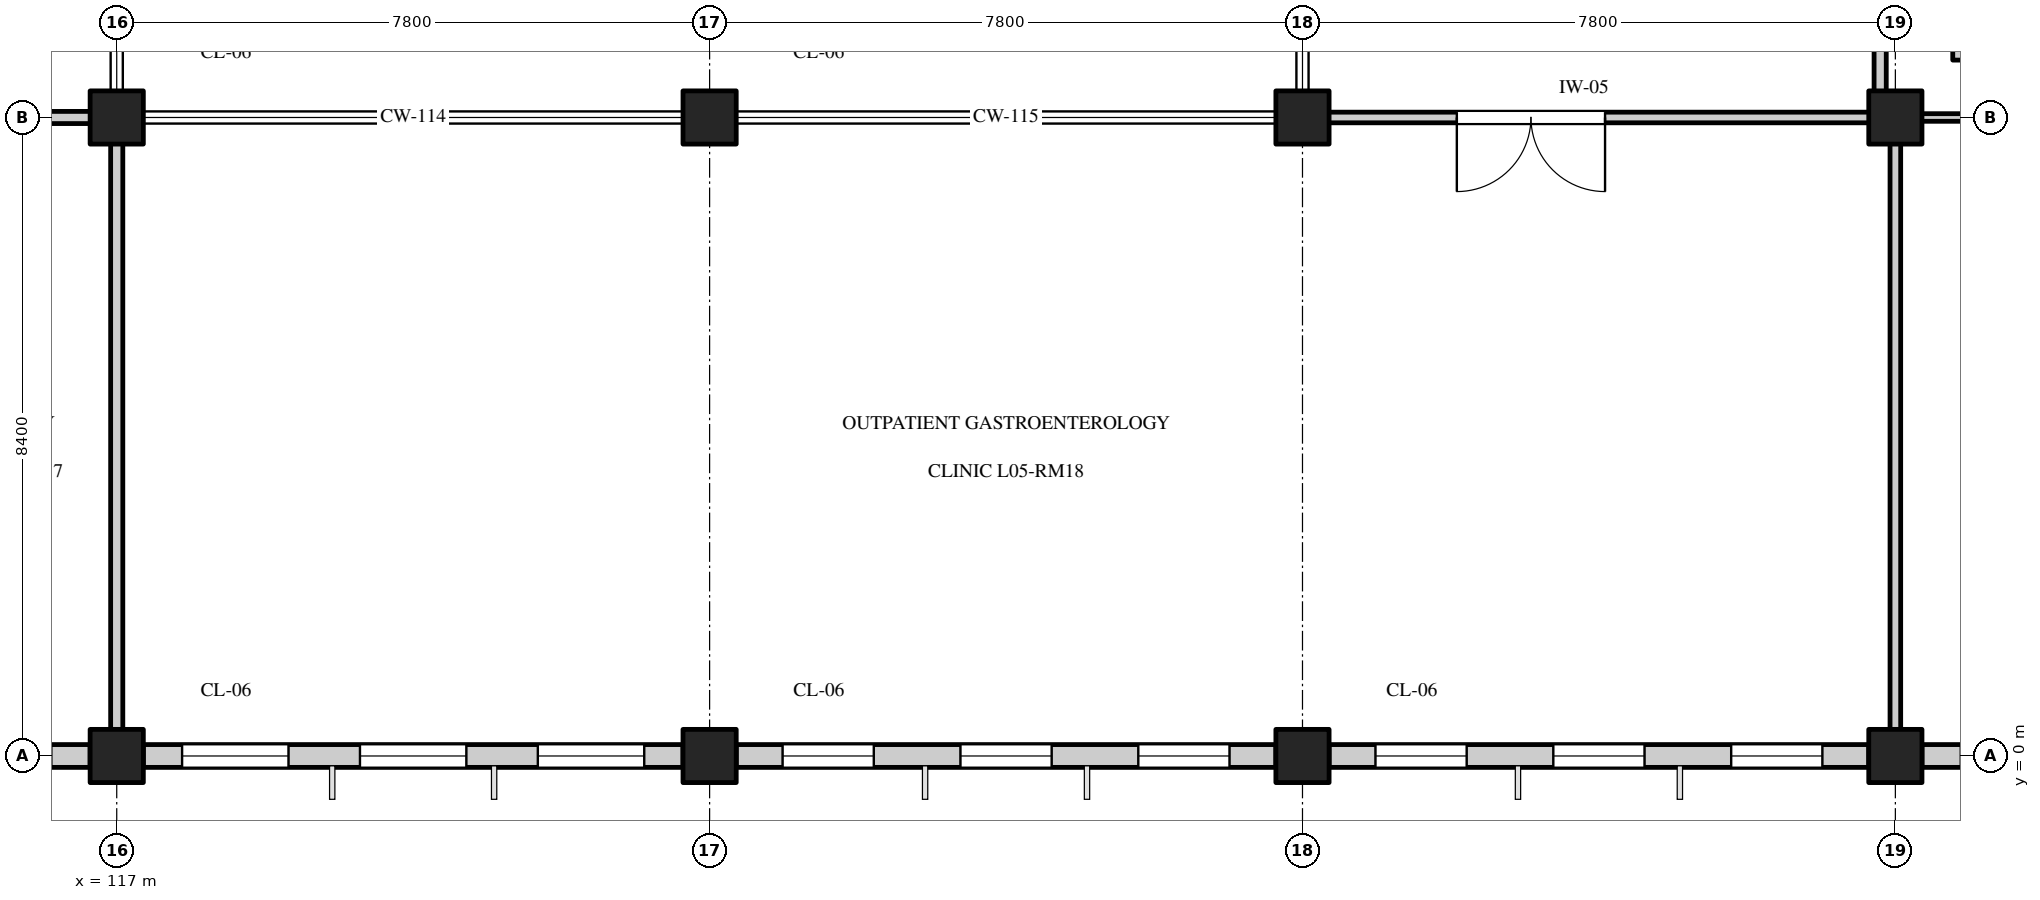
"""IFC4 building model, lengths in metres.
Left out: names, types, materials, properties, quantities, classifications, styles, units other than length and angle.
Written with IfcOpenShell. Run it as: python <this file> out.ifc"""

import sys

from ifc_helpers import new_model, si_unit, direction, frame, frame_2d, origin, origin_2d, place, context, subcontext, project, spatial, rectangle, extrude, element, fill, save


model = new_model("IFC4")
c1 = context("Model", 3, precision=1e-05, world=origin(), true_north=direction((0.0, 1.0)))
c2 = subcontext(c1, "Body", "Model", "MODEL_VIEW")
j1 = project(units=[si_unit("LENGTHUNIT", "METRE"), si_unit("PLANEANGLEUNIT", "RADIAN")], contexts=[c1])
p1 = place(None, origin())
s1 = spatial("IfcSite", under=j1, at=p1, CompositionType="ELEMENT")
p2 = place(p1, origin())
s2 = spatial("IfcBuilding", under=s1, at=p2, CompositionType="ELEMENT")
p3 = place(p2, frame((0.0, 0.0, 22.2)))
s3 = spatial("IfcBuildingStorey", under=s2, at=p3, CompositionType="ELEMENT", Elevation=22.2)
for number, where, z_axis, x_axis in (
    (1, (117.0, 0.0, 0.0), (0.0, 0.0, 1.0), (1.0, 0.0, 0.0)),
    (2, (117.0, 8.4, 0.0), (0.0, 0.0, 1.0), (1.0, 0.0, 0.0)),
    (3, (124.8, 0.0, 0.0), (0.0, 0.0, 1.0), (1.0, 0.0, 0.0)),
    (4, (124.8, 8.4, 0.0), (0.0, 0.0, 1.0), (1.0, 0.0, 0.0)),
    (5, (132.6, 0.0, 0.0), (0.0, 0.0, 1.0), (1.0, 0.0, 0.0)),
    (6, (132.6, 8.4, 0.0), (0.0, 0.0, 1.0), (1.0, 0.0, 0.0)),
    (7, (140.4, 0.0, 0.0), (0.0, 0.0, 1.0), (1.0, 0.0, 0.0)),
    (8, (140.4, 8.4, 0.0), (0.0, 0.0, 1.0), (1.0, 0.0, 0.0)),
):
    element("IfcColumn", number, at=place(p3, frame(where, z_axis=z_axis, x_axis=x_axis)), inside=s3, PredefinedType="COLUMN", context=c2, shape_type="SweptSolid", body=[
        extrude(rectangle(XDim=0.7, YDim=0.7, at=origin_2d()), origin(), (0.0, 0.0, 1.0), 3.9),
    ])
p4 = place(p3, frame((109.55, 0.0, 0.0), z_axis=(0.0, 0.0, 1.0), x_axis=(1.0, 0.0, 0.0)))
e9 = element("IfcWall", 9, at=p4, inside=s3, PredefinedType="STANDARD", context=c2, shape_type="SweptSolid", body=[
    extrude(rectangle(XDim=7.1, YDim=0.3, at=frame_2d((3.55, 0.0))), origin(), (0.0, 0.0, 1.0), 3.05),
])
p5 = place(p4, frame((0.51, 0.0, 0.8)))
e10 = element("IfcOpeningElement", 10, at=p5, cuts=e9, PredefinedType="OPENING", context=c2, shape_type="SweptSolid", body=[
    extrude(rectangle(XDim=1.4, YDim=1.6, at=frame_2d((0.7, 0.8))), frame((0.0, 0.162, 0.0), z_axis=(0.0, -1.0, 0.0), x_axis=(1.0, 0.0, 0.0)), (0.0, 0.0, 1.0), 0.324),
])
p6 = place(p4, frame((2.85, 0.0, 0.8)))
e11 = element("IfcOpeningElement", 11, at=p6, cuts=e9, PredefinedType="OPENING", context=c2, shape_type="SweptSolid", body=[
    extrude(rectangle(XDim=1.4, YDim=1.6, at=frame_2d((0.7, 0.8))), frame((0.0, 0.162, 0.0), z_axis=(0.0, -1.0, 0.0), x_axis=(1.0, 0.0, 0.0)), (0.0, 0.0, 1.0), 0.324),
])
p7 = place(p4, frame((5.19, 0.0, 0.8)))
e12 = element("IfcOpeningElement", 12, at=p7, cuts=e9, PredefinedType="OPENING", context=c2, shape_type="SweptSolid", body=[
    extrude(rectangle(XDim=1.4, YDim=1.6, at=frame_2d((0.7, 0.8))), frame((0.0, 0.162, 0.0), z_axis=(0.0, -1.0, 0.0), x_axis=(1.0, 0.0, 0.0)), (0.0, 0.0, 1.0), 0.324),
])
p8 = place(p3, frame((117.35, 0.0, 0.0), z_axis=(0.0, 0.0, 1.0), x_axis=(1.0, 0.0, 0.0)))
e13 = element("IfcWall", 13, at=p8, inside=s3, PredefinedType="STANDARD", context=c2, shape_type="SweptSolid", body=[
    extrude(rectangle(XDim=7.1, YDim=0.3, at=frame_2d((3.55, 0.0))), origin(), (0.0, 0.0, 1.0), 3.05),
])
p9 = place(p8, frame((0.51, 0.0, 0.8)))
e14 = element("IfcOpeningElement", 14, at=p9, cuts=e13, PredefinedType="OPENING", context=c2, shape_type="SweptSolid", body=[
    extrude(rectangle(XDim=1.4, YDim=1.45, at=frame_2d((0.7, 0.725))), frame((0.0, 0.162, 0.0), z_axis=(0.0, -1.0, 0.0), x_axis=(1.0, 0.0, 0.0)), (0.0, 0.0, 1.0), 0.324),
])
p10 = place(p8, frame((2.85, 0.0, 0.8)))
e15 = element("IfcOpeningElement", 15, at=p10, cuts=e13, PredefinedType="OPENING", context=c2, shape_type="SweptSolid", body=[
    extrude(rectangle(XDim=1.4, YDim=1.45, at=frame_2d((0.7, 0.725))), frame((0.0, 0.162, 0.0), z_axis=(0.0, -1.0, 0.0), x_axis=(1.0, 0.0, 0.0)), (0.0, 0.0, 1.0), 0.324),
])
p11 = place(p8, frame((5.19, 0.0, 0.8)))
e16 = element("IfcOpeningElement", 16, at=p11, cuts=e13, PredefinedType="OPENING", context=c2, shape_type="SweptSolid", body=[
    extrude(rectangle(XDim=1.4, YDim=1.45, at=frame_2d((0.7, 0.725))), frame((0.0, 0.162, 0.0), z_axis=(0.0, -1.0, 0.0), x_axis=(1.0, 0.0, 0.0)), (0.0, 0.0, 1.0), 0.324),
])
p12 = place(p3, frame((125.15, 0.0, 0.0), z_axis=(0.0, 0.0, 1.0), x_axis=(1.0, 0.0, 0.0)))
e17 = element("IfcWall", 17, at=p12, inside=s3, PredefinedType="STANDARD", context=c2, shape_type="SweptSolid", body=[
    extrude(rectangle(XDim=7.1, YDim=0.3, at=frame_2d((3.55, 0.0))), origin(), (0.0, 0.0, 1.0), 3.05),
])
p13 = place(p12, frame((0.61, 0.0, 0.8)))
e18 = element("IfcOpeningElement", 18, at=p13, cuts=e17, PredefinedType="OPENING", context=c2, shape_type="SweptSolid", body=[
    extrude(rectangle(XDim=1.2, YDim=1.55, at=frame_2d((0.6, 0.775))), frame((0.0, 0.162, 0.0), z_axis=(0.0, -1.0, 0.0), x_axis=(1.0, 0.0, 0.0)), (0.0, 0.0, 1.0), 0.324),
])
p14 = place(p12, frame((2.95, 0.0, 0.8)))
e19 = element("IfcOpeningElement", 19, at=p14, cuts=e17, PredefinedType="OPENING", context=c2, shape_type="SweptSolid", body=[
    extrude(rectangle(XDim=1.2, YDim=1.55, at=frame_2d((0.6, 0.775))), frame((0.0, 0.162, 0.0), z_axis=(0.0, -1.0, 0.0), x_axis=(1.0, 0.0, 0.0)), (0.0, 0.0, 1.0), 0.324),
])
p15 = place(p12, frame((5.29, 0.0, 0.8)))
e20 = element("IfcOpeningElement", 20, at=p15, cuts=e17, PredefinedType="OPENING", context=c2, shape_type="SweptSolid", body=[
    extrude(rectangle(XDim=1.2, YDim=1.55, at=frame_2d((0.6, 0.775))), frame((0.0, 0.162, 0.0), z_axis=(0.0, -1.0, 0.0), x_axis=(1.0, 0.0, 0.0)), (0.0, 0.0, 1.0), 0.324),
])
p16 = place(p3, frame((132.95, 0.0, 0.0), z_axis=(0.0, 0.0, 1.0), x_axis=(1.0, 0.0, 0.0)))
e21 = element("IfcWall", 21, at=p16, inside=s3, PredefinedType="STANDARD", context=c2, shape_type="SweptSolid", body=[
    extrude(rectangle(XDim=7.1, YDim=0.3, at=frame_2d((3.55, 0.0))), origin(), (0.0, 0.0, 1.0), 3.05),
])
p17 = place(p16, frame((0.61, 0.0, 0.8)))
e22 = element("IfcOpeningElement", 22, at=p17, cuts=e21, PredefinedType="OPENING", context=c2, shape_type="SweptSolid", body=[
    extrude(rectangle(XDim=1.2, YDim=1.4, at=frame_2d((0.6, 0.7))), frame((0.0, 0.162, 0.0), z_axis=(0.0, -1.0, 0.0), x_axis=(1.0, 0.0, 0.0)), (0.0, 0.0, 1.0), 0.324),
])
p18 = place(p16, frame((2.95, 0.0, 0.8)))
e23 = element("IfcOpeningElement", 23, at=p18, cuts=e21, PredefinedType="OPENING", context=c2, shape_type="SweptSolid", body=[
    extrude(rectangle(XDim=1.2, YDim=1.4, at=frame_2d((0.6, 0.7))), frame((0.0, 0.162, 0.0), z_axis=(0.0, -1.0, 0.0), x_axis=(1.0, 0.0, 0.0)), (0.0, 0.0, 1.0), 0.324),
])
p19 = place(p16, frame((5.29, 0.0, 0.8)))
e24 = element("IfcOpeningElement", 24, at=p19, cuts=e21, PredefinedType="OPENING", context=c2, shape_type="SweptSolid", body=[
    extrude(rectangle(XDim=1.2, YDim=1.4, at=frame_2d((0.6, 0.7))), frame((0.0, 0.162, 0.0), z_axis=(0.0, -1.0, 0.0), x_axis=(1.0, 0.0, 0.0)), (0.0, 0.0, 1.0), 0.324),
])
p20 = place(p3, frame((140.75, 0.0, 0.0), z_axis=(0.0, 0.0, 1.0), x_axis=(1.0, 0.0, 0.0)))
e25 = element("IfcWall", 25, at=p20, inside=s3, PredefinedType="STANDARD", context=c2, shape_type="SweptSolid", body=[
    extrude(rectangle(XDim=7.075, YDim=0.3, at=frame_2d((3.538, 0.0))), origin(), (0.0, 0.0, 1.0), 3.05),
])
p21 = place(p20, frame((0.51, 0.0, 0.8)))
e26 = element("IfcOpeningElement", 26, at=p21, cuts=e25, PredefinedType="OPENING", context=c2, shape_type="SweptSolid", body=[
    extrude(rectangle(XDim=1.4, YDim=1.6, at=frame_2d((0.7, 0.8))), frame((0.0, 0.162, 0.0), z_axis=(0.0, -1.0, 0.0), x_axis=(1.0, 0.0, 0.0)), (0.0, 0.0, 1.0), 0.324),
])
p22 = place(p20, frame((2.85, 0.0, 0.8)))
e27 = element("IfcOpeningElement", 27, at=p22, cuts=e25, PredefinedType="OPENING", context=c2, shape_type="SweptSolid", body=[
    extrude(rectangle(XDim=1.4, YDim=1.6, at=frame_2d((0.7, 0.8))), frame((0.0, 0.162, 0.0), z_axis=(0.0, -1.0, 0.0), x_axis=(1.0, 0.0, 0.0)), (0.0, 0.0, 1.0), 0.324),
])
p23 = place(p20, frame((5.19, 0.0, 0.8)))
e28 = element("IfcOpeningElement", 28, at=p23, cuts=e25, PredefinedType="OPENING", context=c2, shape_type="SweptSolid", body=[
    extrude(rectangle(XDim=1.4, YDim=1.6, at=frame_2d((0.7, 0.8))), frame((0.0, 0.162, 0.0), z_axis=(0.0, -1.0, 0.0), x_axis=(1.0, 0.0, 0.0)), (0.0, 0.0, 1.0), 0.324),
])
p24 = place(p3, frame((141.275, 9.155, 0.0), z_axis=(0.0, 0.0, 1.0), x_axis=(0.0, 1.0, 0.0)))
e29 = element("IfcWall", 29, at=p24, inside=s3, PredefinedType="STANDARD", context=c2, shape_type="SweptSolid", body=[
    extrude(rectangle(XDim=2.695, YDim=0.24, at=frame_2d((1.348, 0.0))), origin(), (0.0, 0.0, 1.0), 3.6),
])
p25 = place(p3, frame((101.485, 8.4, 0.0), z_axis=(0.0, 0.0, 1.0), x_axis=(1.0, 0.0, 0.0)))
e30 = element("IfcWall", 30, at=p25, inside=s3, PredefinedType="PARTITIONING", context=c2, shape_type="SweptSolid", body=[
    extrude(rectangle(XDim=15.43, YDim=0.16, at=frame_2d((7.715, 0.0))), origin(), (0.0, 0.0, 1.0), 3.58),
])
p26 = place(p25, frame((2.315, 0.0, 0.0)))
e31 = element("IfcOpeningElement", 31, at=p26, cuts=e30, PredefinedType="OPENING", context=c2, shape_type="SweptSolid", body=[
    extrude(rectangle(XDim=1.85, YDim=2.3, at=frame_2d((0.925, 1.15))), frame((0.0, 0.092, 0.0), z_axis=(0.0, -1.0, 0.0), x_axis=(1.0, 0.0, 0.0)), (0.0, 0.0, 1.0), 0.184),
])
p27 = place(p3, frame((117.0, 0.085, 0.0), z_axis=(0.0, 0.0, 1.0), x_axis=(0.0, 1.0, 0.0)))
e32 = element("IfcWall", 32, at=p27, inside=s3, PredefinedType="PARTITIONING", context=c2, shape_type="SweptSolid", body=[
    extrude(rectangle(XDim=8.23, YDim=0.16, at=frame_2d((4.115, 0.0))), origin(), (0.0, 0.0, 1.0), 2.95),
])
p28 = place(p3, frame((124.49, 8.4, 0.0), z_axis=(0.0, 0.0, 1.0), x_axis=(1.0, 0.0, 0.0)))
e33 = element("IfcWall", 33, at=p28, inside=s3, PredefinedType="PARTITIONING", context=c2, shape_type="SweptSolid", body=[
    extrude(rectangle(XDim=0.62, YDim=0.14, at=frame_2d((0.31, 0.0))), origin(), (0.0, 0.0, 1.0), 3.58),
])
p29 = place(p3, frame((132.29, 8.4, 0.0), z_axis=(0.0, 0.0, 1.0), x_axis=(1.0, 0.0, 0.0)))
e34 = element("IfcWall", 34, at=p29, inside=s3, PredefinedType="PARTITIONING", context=c2, shape_type="SweptSolid", body=[
    extrude(rectangle(XDim=8.025, YDim=0.14, at=frame_2d((4.012, 0.0))), origin(), (0.0, 0.0, 1.0), 3.58),
])
p30 = place(p29, frame((2.341, 0.0, 0.0)))
e35 = element("IfcOpeningElement", 35, at=p30, cuts=e34, PredefinedType="OPENING", context=c2, shape_type="SweptSolid", body=[
    extrude(rectangle(XDim=1.95, YDim=2.35, at=frame_2d((0.975, 1.175))), frame((0.0, 0.082, 0.0), z_axis=(0.0, -1.0, 0.0), x_axis=(1.0, 0.0, 0.0)), (0.0, 0.0, 1.0), 0.164),
])
p31 = place(p3, frame((124.49, 0.0, 0.0), z_axis=(0.0, 0.0, 1.0), x_axis=(1.0, 0.0, 0.0)))
e36 = element("IfcWall", 36, at=p31, inside=s3, PredefinedType="PARTITIONING", context=c2, shape_type="SweptSolid", body=[
    extrude(rectangle(XDim=0.62, YDim=0.14, at=frame_2d((0.31, 0.0))), origin(), (0.0, 0.0, 1.0), 2.95),
])
p32 = place(p3, frame((132.29, 0.0, 0.0), z_axis=(0.0, 0.0, 1.0), x_axis=(1.0, 0.0, 0.0)))
e37 = element("IfcWall", 37, at=p32, inside=s3, PredefinedType="PARTITIONING", context=c2, shape_type="SweptSolid", body=[
    extrude(rectangle(XDim=0.62, YDim=0.14, at=frame_2d((0.31, 0.0))), origin(), (0.0, 0.0, 1.0), 2.95),
])
p33 = place(p3, frame((140.4, 0.085, 0.0), z_axis=(0.0, 0.0, 1.0), x_axis=(0.0, 1.0, 0.0)))
e38 = element("IfcWall", 38, at=p33, inside=s3, PredefinedType="PARTITIONING", context=c2, shape_type="SweptSolid", body=[
    extrude(rectangle(XDim=8.23, YDim=0.14, at=frame_2d((4.115, 0.0))), origin(), (0.0, 0.0, 1.0), 3.58),
])
p34 = place(p3, frame((140.2, 8.485, 0.0), z_axis=(0.0, 0.0, 1.0), x_axis=(0.0, 1.0, 0.0)))
e39 = element("IfcWall", 39, at=p34, inside=s3, PredefinedType="PARTITIONING", context=c2, shape_type="SweptSolid", body=[
    extrude(rectangle(XDim=16.63, YDim=0.16, at=frame_2d((8.315, 0.0))), origin(), (0.0, 0.0, 1.0), 3.58),
])
p35 = place(p3, frame((140.485, 8.4, 0.0), z_axis=(0.0, 0.0, 1.0), x_axis=(1.0, 0.0, 0.0)))
e40 = element("IfcWall", 40, at=p35, inside=s3, PredefinedType="PARTITIONING", context=c2, shape_type="SweptSolid", body=[
    extrude(rectangle(XDim=7.43, YDim=0.1, at=frame_2d((3.715, 0.0))), origin(), (0.0, 0.0, 1.0), 3.58),
])
p36 = place(p35, frame((4.055, 0.0, 0.0)))
e41 = element("IfcOpeningElement", 41, at=p36, cuts=e40, PredefinedType="OPENING", context=c2, shape_type="SweptSolid", body=[
    extrude(rectangle(XDim=1.08, YDim=2.15, at=frame_2d((0.54, 1.075))), frame((0.0, 0.062, 0.0), z_axis=(0.0, -1.0, 0.0), x_axis=(1.0, 0.0, 0.0)), (0.0, 0.0, 1.0), 0.124),
])
p37 = place(p9, origin())
e42 = element("IfcWindow", 42, at=p37, inside=s3, PartitioningType="SINGLE_PANEL", PredefinedType="WINDOW", context=c2, shape_type="SweptSolid", body=[
    extrude(rectangle(XDim=1.4, YDim=1.45, at=frame_2d((0.7, 0.725))), frame((0.0, 0.03, 0.0), z_axis=(0.0, -1.0, 0.0), x_axis=(1.0, 0.0, 0.0)), (0.0, 0.0, 1.0), 0.06),
])
fill(e14, e42)
p38 = place(p10, origin())
e43 = element("IfcWindow", 43, at=p38, inside=s3, PartitioningType="SINGLE_PANEL", PredefinedType="WINDOW", context=c2, shape_type="SweptSolid", body=[
    extrude(rectangle(XDim=1.4, YDim=1.45, at=frame_2d((0.7, 0.725))), frame((0.0, 0.03, 0.0), z_axis=(0.0, -1.0, 0.0), x_axis=(1.0, 0.0, 0.0)), (0.0, 0.0, 1.0), 0.06),
])
fill(e15, e43)
p39 = place(p11, origin())
e44 = element("IfcWindow", 44, at=p39, inside=s3, PartitioningType="SINGLE_PANEL", PredefinedType="WINDOW", context=c2, shape_type="SweptSolid", body=[
    extrude(rectangle(XDim=1.4, YDim=1.45, at=frame_2d((0.7, 0.725))), frame((0.0, 0.03, 0.0), z_axis=(0.0, -1.0, 0.0), x_axis=(1.0, 0.0, 0.0)), (0.0, 0.0, 1.0), 0.06),
])
fill(e16, e44)
p40 = place(p13, origin())
e45 = element("IfcWindow", 45, at=p40, inside=s3, PartitioningType="SINGLE_PANEL", PredefinedType="WINDOW", context=c2, shape_type="SweptSolid", body=[
    extrude(rectangle(XDim=1.2, YDim=1.55, at=frame_2d((0.6, 0.775))), frame((0.0, 0.03, 0.0), z_axis=(0.0, -1.0, 0.0), x_axis=(1.0, 0.0, 0.0)), (0.0, 0.0, 1.0), 0.06),
])
fill(e18, e45)
p41 = place(p14, origin())
e46 = element("IfcWindow", 46, at=p41, inside=s3, PartitioningType="SINGLE_PANEL", PredefinedType="WINDOW", context=c2, shape_type="SweptSolid", body=[
    extrude(rectangle(XDim=1.2, YDim=1.55, at=frame_2d((0.6, 0.775))), frame((0.0, 0.03, 0.0), z_axis=(0.0, -1.0, 0.0), x_axis=(1.0, 0.0, 0.0)), (0.0, 0.0, 1.0), 0.06),
])
fill(e19, e46)
p42 = place(p15, origin())
e47 = element("IfcWindow", 47, at=p42, inside=s3, PartitioningType="SINGLE_PANEL", PredefinedType="WINDOW", context=c2, shape_type="SweptSolid", body=[
    extrude(rectangle(XDim=1.2, YDim=1.55, at=frame_2d((0.6, 0.775))), frame((0.0, 0.03, 0.0), z_axis=(0.0, -1.0, 0.0), x_axis=(1.0, 0.0, 0.0)), (0.0, 0.0, 1.0), 0.06),
])
fill(e20, e47)
p43 = place(p17, origin())
e48 = element("IfcWindow", 48, at=p43, inside=s3, PartitioningType="SINGLE_PANEL", PredefinedType="WINDOW", context=c2, shape_type="SweptSolid", body=[
    extrude(rectangle(XDim=1.2, YDim=1.4, at=frame_2d((0.6, 0.7))), frame((0.0, 0.03, 0.0), z_axis=(0.0, -1.0, 0.0), x_axis=(1.0, 0.0, 0.0)), (0.0, 0.0, 1.0), 0.06),
])
fill(e22, e48)
p44 = place(p18, origin())
e49 = element("IfcWindow", 49, at=p44, inside=s3, PartitioningType="SINGLE_PANEL", PredefinedType="WINDOW", context=c2, shape_type="SweptSolid", body=[
    extrude(rectangle(XDim=1.2, YDim=1.4, at=frame_2d((0.6, 0.7))), frame((0.0, 0.03, 0.0), z_axis=(0.0, -1.0, 0.0), x_axis=(1.0, 0.0, 0.0)), (0.0, 0.0, 1.0), 0.06),
])
fill(e23, e49)
p45 = place(p19, origin())
e50 = element("IfcWindow", 50, at=p45, inside=s3, PartitioningType="SINGLE_PANEL", PredefinedType="WINDOW", context=c2, shape_type="SweptSolid", body=[
    extrude(rectangle(XDim=1.2, YDim=1.4, at=frame_2d((0.6, 0.7))), frame((0.0, 0.03, 0.0), z_axis=(0.0, -1.0, 0.0), x_axis=(1.0, 0.0, 0.0)), (0.0, 0.0, 1.0), 0.06),
])
fill(e24, e50)
p46 = place(p30, frame((1.95, 0.0, 0.0), z_axis=(0.0, 0.0, 1.0), x_axis=(-1.0, 0.0, 0.0)))
e51 = element("IfcDoor", 51, at=p46, inside=s3, OperationType="DOUBLE_DOOR_SINGLE_SWING", PredefinedType="DOOR", context=c2, shape_type="SweptSolid", body=[
    extrude(rectangle(XDim=1.95, YDim=2.35, at=frame_2d((0.975, 1.175))), frame((0.0, 0.025, 0.0), z_axis=(0.0, -1.0, 0.0), x_axis=(1.0, 0.0, 0.0)), (0.0, 0.0, 1.0), 0.05),
])
fill(e35, e51)
save(model, sys.argv[1])
